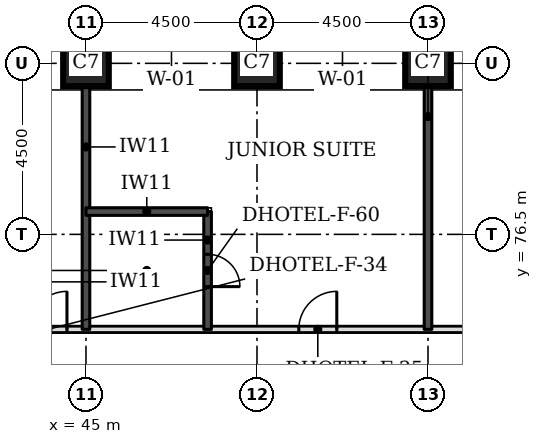
"""IFC4 building model, lengths in metres.
Left out: names, types, materials, properties, quantities, classifications, styles, units other than length and angle.
Written with IfcOpenShell. Run it as: python <this file> out.ifc"""

import sys

from ifc_helpers import new_model, si_unit, direction, frame, frame_2d, origin, origin_2d, place, context, subcontext, project, spatial, rectangle, extrude, element, fill, save


model = new_model("IFC4")
c1 = context("Model", 3, precision=1e-05, world=origin(), true_north=direction((0.0, 1.0)))
c2 = subcontext(c1, "Body", "Model", "MODEL_VIEW")
j1 = project(units=[si_unit("LENGTHUNIT", "METRE"), si_unit("PLANEANGLEUNIT", "RADIAN")], contexts=[c1])
p1 = place(None, origin())
s1 = spatial("IfcSite", under=j1, at=p1, CompositionType="ELEMENT")
p2 = place(p1, origin())
s2 = spatial("IfcBuilding", under=s1, at=p2, CompositionType="ELEMENT")
p3 = place(p2, frame((0.0, 0.0, 42.9)))
s3 = spatial("IfcBuildingStorey", under=s2, at=p3, CompositionType="ELEMENT", Elevation=42.9)
for number, where, z_axis, x_axis in (
    (1, (45.0, 81.0, 0.0), (0.0, 0.0, 1.0), (1.0, 0.0, 0.0)),
    (2, (49.5, 81.0, 0.0), (0.0, 0.0, 1.0), (1.0, 0.0, 0.0)),
    (3, (54.0, 81.0, 0.0), (0.0, 0.0, 1.0), (1.0, 0.0, 0.0)),
):
    element("IfcColumn", number, at=place(p3, frame(where, z_axis=z_axis, x_axis=x_axis)), inside=s3, PredefinedType="COLUMN", context=c2, shape_type="SweptSolid", body=[
        extrude(rectangle(XDim=1.2, YDim=1.2, at=origin_2d()), origin(), (0.0, 0.0, 1.0), 3.3),
    ])
p4 = place(p3, frame((43.0, 74.0, 0.0), z_axis=(0.0, 0.0, 1.0), x_axis=(1.0, 0.0, 0.0)))
e4 = element("IfcWall", 4, at=p4, inside=s3, PredefinedType="PARTITIONING", context=c2, shape_type="SweptSolid", body=[
    extrude(rectangle(XDim=26.5, YDim=0.15, at=frame_2d((13.25, 0.0))), origin(), (0.0, 0.0, 1.0), 3.08),
])
p5 = place(p4, frame((7.6, 0.0, 0.0)))
e5 = element("IfcOpeningElement", 5, at=p5, cuts=e4, PredefinedType="OPENING", context=c2, shape_type="SweptSolid", body=[
    extrude(rectangle(XDim=1.0, YDim=2.1, at=frame_2d((0.5, 1.05))), frame((0.0, 0.085, 0.0), z_axis=(0.0, -1.0, 0.0), x_axis=(1.0, 0.0, 0.0)), (0.0, 0.0, 1.0), 0.17),
])
p6 = place(p4, frame((13.65, 0.0, 0.0)))
e6 = element("IfcOpeningElement", 6, at=p6, cuts=e4, PredefinedType="OPENING", context=c2, shape_type="SweptSolid", body=[
    extrude(rectangle(XDim=1.0, YDim=2.1, at=frame_2d((0.5, 1.05))), frame((0.0, 0.085, 0.0), z_axis=(0.0, -1.0, 0.0), x_axis=(1.0, 0.0, 0.0)), (0.0, 0.0, 1.0), 0.17),
])
p7 = place(p4, frame((23.05, 0.0, 0.0)))
e7 = element("IfcOpeningElement", 7, at=p7, cuts=e4, PredefinedType="OPENING", context=c2, shape_type="SweptSolid", body=[
    extrude(rectangle(XDim=1.0, YDim=2.1, at=frame_2d((0.5, 1.05))), frame((0.0, 0.085, 0.0), z_axis=(0.0, -1.0, 0.0), x_axis=(1.0, 0.0, 0.0)), (0.0, 0.0, 1.0), 0.17),
])
p8 = place(p4, frame((0.5, 0.0, 0.0)))
e8 = element("IfcOpeningElement", 8, at=p8, cuts=e4, PredefinedType="OPENING", context=c2, shape_type="SweptSolid", body=[
    extrude(rectangle(XDim=1.0, YDim=2.1, at=frame_2d((0.5, 1.05))), frame((0.0, 0.085, 0.0), z_axis=(0.0, -1.0, 0.0), x_axis=(1.0, 0.0, 0.0)), (0.0, 0.0, 1.0), 0.17),
])
p9 = place(p4, frame((25.0, 0.0, 0.0)))
e9 = element("IfcOpeningElement", 9, at=p9, cuts=e4, PredefinedType="OPENING", context=c2, shape_type="SweptSolid", body=[
    extrude(rectangle(XDim=1.0, YDim=2.1, at=frame_2d((0.5, 1.05))), frame((0.0, 0.085, 0.0), z_axis=(0.0, -1.0, 0.0), x_axis=(1.0, 0.0, 0.0)), (0.0, 0.0, 1.0), 0.17),
])
p10 = place(p3, frame((45.0, 74.0, 0.0), z_axis=(0.0, 0.0, 1.0), x_axis=(0.0, 1.0, 0.0)))
e10 = element("IfcWall", 10, at=p10, inside=s3, PredefinedType="SOLIDWALL", context=c2, shape_type="SweptSolid", body=[
    extrude(rectangle(XDim=6.4, YDim=0.2, at=frame_2d((3.2, 0.0))), origin(), (0.0, 0.0, 1.0), 3.08),
])
p11 = place(p3, frame((48.2, 74.0, 0.0), z_axis=(0.0, 0.0, 1.0), x_axis=(0.0, 1.0, 0.0)))
e11 = element("IfcWall", 11, at=p11, inside=s3, PredefinedType="SOLIDWALL", context=c2, shape_type="SweptSolid", body=[
    extrude(rectangle(XDim=3.1, YDim=0.2, at=frame_2d((1.55, 0.0))), origin(), (0.0, 0.0, 1.0), 3.08),
])
p12 = place(p11, frame((1.125, 0.0, 0.0)))
e12 = element("IfcOpeningElement", 12, at=p12, cuts=e11, PredefinedType="OPENING", context=c2, shape_type="SweptSolid", body=[
    extrude(rectangle(XDim=0.85, YDim=2.1, at=frame_2d((0.425, 1.05))), frame((0.0, 0.11, 0.0), z_axis=(0.0, -1.0, 0.0), x_axis=(1.0, 0.0, 0.0)), (0.0, 0.0, 1.0), 0.22),
])
p13 = place(p3, frame((54.0, 74.0, 0.0), z_axis=(0.0, 0.0, 1.0), x_axis=(0.0, 1.0, 0.0)))
e13 = element("IfcWall", 13, at=p13, inside=s3, PredefinedType="SOLIDWALL", context=c2, shape_type="SweptSolid", body=[
    extrude(rectangle(XDim=6.4, YDim=0.2, at=frame_2d((3.2, 0.0))), origin(), (0.0, 0.0, 1.0), 3.08),
])
p14 = place(p3, frame((45.0, 77.1, 0.0), z_axis=(0.0, 0.0, 1.0), x_axis=(1.0, 0.0, 0.0)))
e14 = element("IfcWall", 14, at=p14, inside=s3, PredefinedType="SOLIDWALL", context=c2, shape_type="SweptSolid", body=[
    extrude(rectangle(XDim=3.2, YDim=0.2, at=frame_2d((1.6, 0.0))), origin(), (0.0, 0.0, 1.0), 3.08),
])
p15 = place(p5, origin())
e15 = element("IfcDoor", 15, at=p15, inside=s3, OperationType="SINGLE_SWING_RIGHT", PredefinedType="DOOR", context=c2, shape_type="SweptSolid", body=[
    extrude(rectangle(XDim=1.0, YDim=2.1, at=frame_2d((0.5, 1.05))), frame((0.0, 0.025, 0.0), z_axis=(0.0, -1.0, 0.0), x_axis=(1.0, 0.0, 0.0)), (0.0, 0.0, 1.0), 0.05),
])
fill(e5, e15)
p16 = place(p12, frame((0.85, 0.0, 0.0), z_axis=(0.0, 0.0, 1.0), x_axis=(-1.0, 0.0, 0.0)))
e16 = element("IfcDoor", 16, at=p16, inside=s3, OperationType="SINGLE_SWING_RIGHT", PredefinedType="DOOR", context=c2, shape_type="SweptSolid", body=[
    extrude(rectangle(XDim=0.85, YDim=2.1, at=frame_2d((0.425, 1.05))), frame((0.0, 0.025, 0.0), z_axis=(0.0, -1.0, 0.0), x_axis=(1.0, 0.0, 0.0)), (0.0, 0.0, 1.0), 0.05),
])
fill(e12, e16)
p17 = place(p8, origin())
e17 = element("IfcDoor", 17, at=p17, inside=s3, OperationType="SINGLE_SWING_RIGHT", PredefinedType="DOOR", context=c2, shape_type="SweptSolid", body=[
    extrude(rectangle(XDim=1.0, YDim=2.1, at=frame_2d((0.5, 1.05))), frame((0.0, 0.025, 0.0), z_axis=(0.0, -1.0, 0.0), x_axis=(1.0, 0.0, 0.0)), (0.0, 0.0, 1.0), 0.05),
])
fill(e8, e17)
save(model, sys.argv[1])
